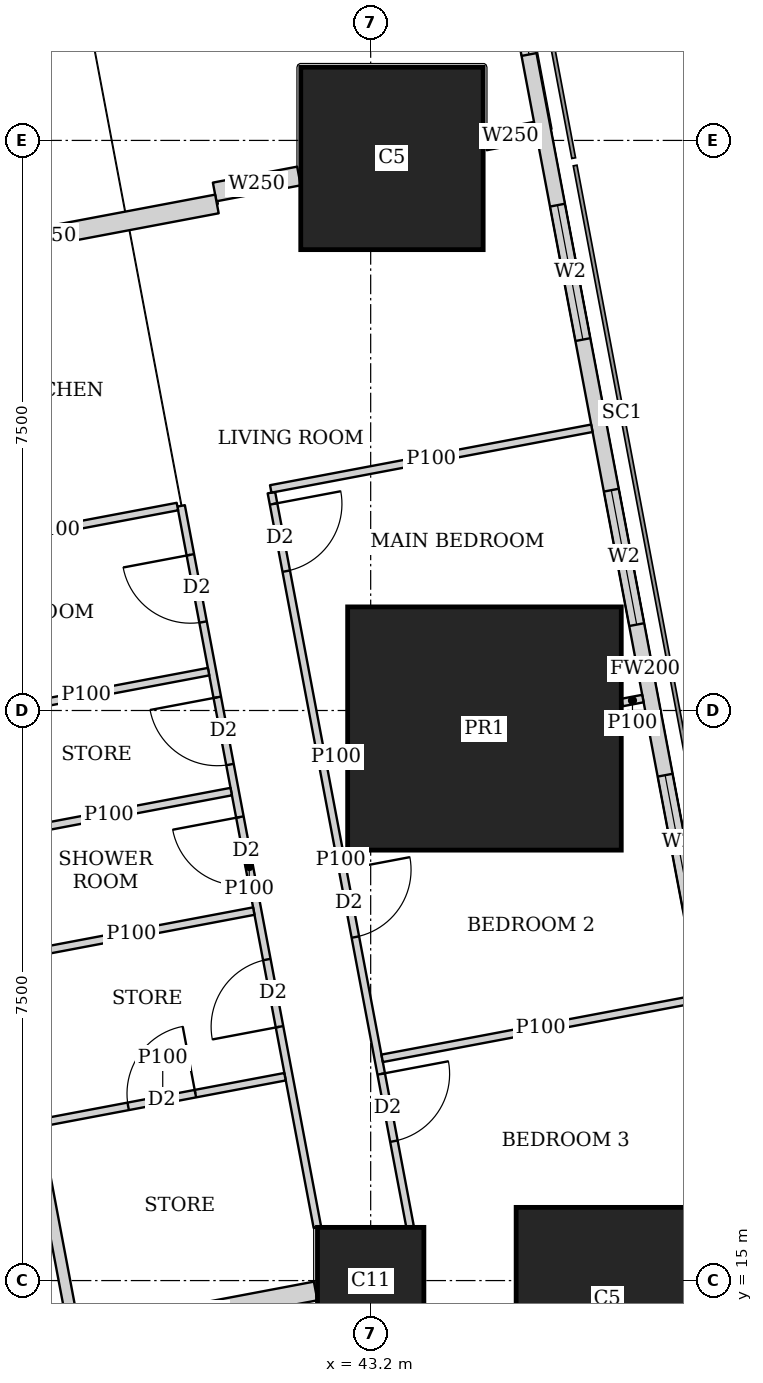
"""IFC4 building model, lengths in metres.
Left out: names, types, materials, properties, quantities, classifications, styles, units other than length and angle.
Written with IfcOpenShell. Run it as: python <this file> out.ifc"""

import sys

from ifc_helpers import new_model, si_unit, direction, frame, frame_2d, origin, origin_2d, place, context, subcontext, project, spatial, rectangle, extrude, element, fill, save


model = new_model("IFC4")
c1 = context("Model", 3, precision=1e-05, world=origin(), true_north=direction((0.0, 1.0)))
c2 = subcontext(c1, "Body", "Model", "MODEL_VIEW")
j1 = project(units=[si_unit("LENGTHUNIT", "METRE"), si_unit("PLANEANGLEUNIT", "RADIAN")], contexts=[c1])
p1 = place(None, origin())
s1 = spatial("IfcSite", under=j1, at=p1, CompositionType="ELEMENT")
p2 = place(p1, origin())
s2 = spatial("IfcBuilding", under=s1, at=p2, CompositionType="ELEMENT")
p3 = place(p2, frame((0.0, 0.0, 242.45)))
s3 = spatial("IfcBuildingStorey", under=s2, at=p3, CompositionType="ELEMENT", Elevation=242.45)
p4 = place(p3, frame((43.2, 15.0, 0.0), z_axis=(0.0, 0.0, 1.0), x_axis=(1.0, 0.0, 0.0)))
e1 = element("IfcColumn", 1, at=p4, inside=s3, PredefinedType="COLUMN", context=c2, shape_type="SweptSolid", body=[
    extrude(rectangle(XDim=1.4, YDim=1.4, at=origin_2d()), origin(), (0.0, 0.0, 1.0), 3.75),
])
p5 = place(p3, frame((46.314, 14.763, 0.0), z_axis=(0.0, 0.0, 1.0), x_axis=(1.0, 0.0, 0.0)))
e2 = element("IfcColumn", 2, at=p5, inside=s3, PredefinedType="COLUMN", context=c2, shape_type="SweptSolid", body=[
    extrude(rectangle(XDim=2.4, YDim=2.4, at=origin_2d()), origin(), (0.0, 0.0, 1.0), 3.75),
])
p6 = place(p3, frame((44.697, 22.263, 0.0), z_axis=(0.0, 0.0, 1.0), x_axis=(1.0, 0.0, 0.0)))
e3 = element("IfcColumn", 3, at=p6, inside=s3, PredefinedType="COLUMN", context=c2, shape_type="SweptSolid", body=[
    extrude(rectangle(XDim=3.6, YDim=3.2, at=origin_2d()), origin(), (0.0, 0.0, 1.0), 3.75),
])
p7 = place(p3, frame((43.48, 29.763, 0.0), z_axis=(0.0, 0.0, 1.0), x_axis=(1.0, 0.0, 0.0)))
e4 = element("IfcColumn", 4, at=p7, inside=s3, PredefinedType="COLUMN", context=c2, shape_type="SweptSolid", body=[
    extrude(rectangle(XDim=2.4, YDim=2.4, at=origin_2d()), origin(), (0.0, 0.0, 1.0), 3.75),
])
p8 = place(p3, frame((50.653, 2.703, 0.0), z_axis=(0.0, 0.0, 1.0), x_axis=(-0.185612026696, 0.982623109613, 0.0)))
e5 = element("IfcWall", 5, at=p8, inside=s3, PredefinedType="SOLIDWALL", context=c2, shape_type="SweptSolid", body=[
    extrude(rectangle(XDim=41.393, YDim=0.2, at=frame_2d((20.697, 0.0))), origin(), (0.0, 0.0, 1.0), 3.45),
])
p9 = place(p8, frame((1.633, 0.0, 0.9)))
e6 = element("IfcOpeningElement", 6, at=p9, cuts=e5, PredefinedType="OPENING", context=c2, shape_type="SweptSolid", body=[
    extrude(rectangle(XDim=1.8, YDim=1.5, at=frame_2d((0.9, 0.75))), frame((0.0, 0.11, 0.0), z_axis=(0.0, -1.0, 0.0), x_axis=(1.0, 0.0, 0.0)), (0.0, 0.0, 1.0), 0.22),
])
p10 = place(p8, frame((6.032, 0.0, 0.9)))
e7 = element("IfcOpeningElement", 7, at=p10, cuts=e5, PredefinedType="OPENING", context=c2, shape_type="SweptSolid", body=[
    extrude(rectangle(XDim=1.8, YDim=1.5, at=frame_2d((0.9, 0.75))), frame((0.0, 0.11, 0.0), z_axis=(0.0, -1.0, 0.0), x_axis=(1.0, 0.0, 0.0)), (0.0, 0.0, 1.0), 0.22),
])
p11 = place(p8, frame((9.848, 0.0, 0.9)))
e8 = element("IfcOpeningElement", 8, at=p11, cuts=e5, PredefinedType="OPENING", context=c2, shape_type="SweptSolid", body=[
    extrude(rectangle(XDim=1.8, YDim=1.5, at=frame_2d((0.9, 0.75))), frame((0.0, 0.11, 0.0), z_axis=(0.0, -1.0, 0.0), x_axis=(1.0, 0.0, 0.0)), (0.0, 0.0, 1.0), 0.22),
])
p12 = place(p8, frame((13.664, 0.0, 0.9)))
e9 = element("IfcOpeningElement", 9, at=p12, cuts=e5, PredefinedType="OPENING", context=c2, shape_type="SweptSolid", body=[
    extrude(rectangle(XDim=1.8, YDim=1.5, at=frame_2d((0.9, 0.75))), frame((0.0, 0.11, 0.0), z_axis=(0.0, -1.0, 0.0), x_axis=(1.0, 0.0, 0.0)), (0.0, 0.0, 1.0), 0.22),
])
p13 = place(p8, frame((17.481, 0.0, 0.9)))
e10 = element("IfcOpeningElement", 10, at=p13, cuts=e5, PredefinedType="OPENING", context=c2, shape_type="SweptSolid", body=[
    extrude(rectangle(XDim=1.8, YDim=1.5, at=frame_2d((0.9, 0.75))), frame((0.0, 0.11, 0.0), z_axis=(0.0, -1.0, 0.0), x_axis=(1.0, 0.0, 0.0)), (0.0, 0.0, 1.0), 0.22),
])
p14 = place(p8, frame((21.297, 0.0, 0.9)))
e11 = element("IfcOpeningElement", 11, at=p14, cuts=e5, PredefinedType="OPENING", context=c2, shape_type="SweptSolid", body=[
    extrude(rectangle(XDim=1.8, YDim=1.5, at=frame_2d((0.9, 0.75))), frame((0.0, 0.11, 0.0), z_axis=(0.0, -1.0, 0.0), x_axis=(1.0, 0.0, 0.0)), (0.0, 0.0, 1.0), 0.22),
])
p15 = place(p8, frame((25.113, 0.0, 0.9)))
e12 = element("IfcOpeningElement", 12, at=p15, cuts=e5, PredefinedType="OPENING", context=c2, shape_type="SweptSolid", body=[
    extrude(rectangle(XDim=1.8, YDim=1.5, at=frame_2d((0.9, 0.75))), frame((0.0, 0.11, 0.0), z_axis=(0.0, -1.0, 0.0), x_axis=(1.0, 0.0, 0.0)), (0.0, 0.0, 1.0), 0.22),
])
p16 = place(p8, frame((28.93, 0.0, 0.9)))
e13 = element("IfcOpeningElement", 13, at=p16, cuts=e5, PredefinedType="OPENING", context=c2, shape_type="SweptSolid", body=[
    extrude(rectangle(XDim=1.8, YDim=1.5, at=frame_2d((0.9, 0.75))), frame((0.0, 0.11, 0.0), z_axis=(0.0, -1.0, 0.0), x_axis=(1.0, 0.0, 0.0)), (0.0, 0.0, 1.0), 0.22),
])
p17 = place(p8, frame((32.746, 0.0, 0.9)))
e14 = element("IfcOpeningElement", 14, at=p17, cuts=e5, PredefinedType="OPENING", context=c2, shape_type="SweptSolid", body=[
    extrude(rectangle(XDim=1.8, YDim=1.5, at=frame_2d((0.9, 0.75))), frame((0.0, 0.11, 0.0), z_axis=(0.0, -1.0, 0.0), x_axis=(1.0, 0.0, 0.0)), (0.0, 0.0, 1.0), 0.22),
])
p18 = place(p8, frame((36.481, 0.0, 0.9)))
e15 = element("IfcOpeningElement", 15, at=p18, cuts=e5, PredefinedType="OPENING", context=c2, shape_type="SweptSolid", body=[
    extrude(rectangle(XDim=1.8, YDim=1.5, at=frame_2d((0.9, 0.75))), frame((0.0, 0.11, 0.0), z_axis=(0.0, -1.0, 0.0), x_axis=(1.0, 0.0, 0.0)), (0.0, 0.0, 1.0), 0.22),
])
p19 = place(p3, frame((33.933, 42.73, 0.0), z_axis=(0.0, 0.0, 1.0), x_axis=(0.185595417643, -0.982626246825, 0.0)))
e16 = element("IfcWall", 16, at=p19, inside=s3, PredefinedType="SOLIDWALL", context=c2, shape_type="SweptSolid", body=[
    extrude(rectangle(XDim=41.051, YDim=0.15, at=frame_2d((20.525, 0.0))), origin(), (0.0, 0.0, 1.0), 2.45),
])
p20 = place(p19, frame((12.266, 0.0, 0.0)))
e17 = element("IfcOpeningElement", 17, at=p20, cuts=e16, PredefinedType="OPENING", context=c2, shape_type="SweptSolid", body=[
    extrude(rectangle(XDim=1.0, YDim=2.1, at=frame_2d((0.5, 1.05))), frame((0.0, 0.085, 0.0), z_axis=(0.0, -1.0, 0.0), x_axis=(1.0, 0.0, 0.0)), (0.0, 0.0, 1.0), 0.17),
])
p21 = place(p19, frame((16.082, 0.0, 0.0)))
e18 = element("IfcOpeningElement", 18, at=p21, cuts=e16, PredefinedType="OPENING", context=c2, shape_type="SweptSolid", body=[
    extrude(rectangle(XDim=1.0, YDim=2.1, at=frame_2d((0.5, 1.05))), frame((0.0, 0.085, 0.0), z_axis=(0.0, -1.0, 0.0), x_axis=(1.0, 0.0, 0.0)), (0.0, 0.0, 1.0), 0.17),
])
p22 = place(p19, frame((30.862, 0.0, 0.0)))
e19 = element("IfcOpeningElement", 19, at=p22, cuts=e16, PredefinedType="OPENING", context=c2, shape_type="SweptSolid", body=[
    extrude(rectangle(XDim=1.0, YDim=2.1, at=frame_2d((0.5, 1.05))), frame((0.0, 0.085, 0.0), z_axis=(0.0, -1.0, 0.0), x_axis=(1.0, 0.0, 0.0)), (0.0, 0.0, 1.0), 0.17),
])
p23 = place(p3, frame((41.894, 25.366, 0.0), z_axis=(0.0, 0.0, 1.0), x_axis=(0.185612905165, -0.982622943675, 0.0)))
e20 = element("IfcWall", 20, at=p23, inside=s3, PredefinedType="PARTITIONING", context=c2, shape_type="SweptSolid", body=[
    extrude(rectangle(XDim=9.827, YDim=0.1, at=frame_2d((4.913, 0.0))), origin(), (0.0, 0.0, 1.0), 2.45),
])
p24 = place(p23, frame((0.151, 0.0, 0.0)))
e21 = element("IfcOpeningElement", 21, at=p24, cuts=e20, PredefinedType="OPENING", context=c2, shape_type="SweptSolid", body=[
    extrude(rectangle(XDim=0.9, YDim=2.1, at=frame_2d((0.45, 1.05))), frame((0.0, 0.06, 0.0), z_axis=(0.0, -1.0, 0.0), x_axis=(1.0, 0.0, 0.0)), (0.0, 0.0, 1.0), 0.12),
])
p25 = place(p23, frame((5.05, 0.0, 0.0)))
e22 = element("IfcOpeningElement", 22, at=p25, cuts=e20, PredefinedType="OPENING", context=c2, shape_type="SweptSolid", body=[
    extrude(rectangle(XDim=0.9, YDim=2.1, at=frame_2d((0.45, 1.05))), frame((0.0, 0.06, 0.0), z_axis=(0.0, -1.0, 0.0), x_axis=(1.0, 0.0, 0.0)), (0.0, 0.0, 1.0), 0.12),
])
p26 = place(p23, frame((7.783, 0.0, 0.0)))
e23 = element("IfcOpeningElement", 23, at=p26, cuts=e20, PredefinedType="OPENING", context=c2, shape_type="SweptSolid", body=[
    extrude(rectangle(XDim=0.9, YDim=2.1, at=frame_2d((0.45, 1.05))), frame((0.0, 0.06, 0.0), z_axis=(0.0, -1.0, 0.0), x_axis=(1.0, 0.0, 0.0)), (0.0, 0.0, 1.0), 0.12),
])
p27 = place(p3, frame((40.706, 25.192, 0.0), z_axis=(0.0, 0.0, 1.0), x_axis=(0.185629824463, -0.982619747547, 0.0)))
e24 = element("IfcWall", 24, at=p27, inside=s3, PredefinedType="PARTITIONING", context=c2, shape_type="SweptSolid", body=[
    extrude(rectangle(XDim=9.659, YDim=0.1, at=frame_2d((4.83, 0.0))), origin(), (0.0, 0.0, 1.0), 2.45),
])
p28 = place(p27, frame((0.655, 0.0, 0.0)))
e25 = element("IfcOpeningElement", 25, at=p28, cuts=e24, PredefinedType="OPENING", context=c2, shape_type="SweptSolid", body=[
    extrude(rectangle(XDim=0.9, YDim=2.1, at=frame_2d((0.45, 1.05))), frame((0.0, 0.06, 0.0), z_axis=(0.0, -1.0, 0.0), x_axis=(1.0, 0.0, 0.0)), (0.0, 0.0, 1.0), 0.12),
])
p29 = place(p27, frame((4.166, 0.0, 0.0)))
e26 = element("IfcOpeningElement", 26, at=p29, cuts=e24, PredefinedType="OPENING", context=c2, shape_type="SweptSolid", body=[
    extrude(rectangle(XDim=0.9, YDim=2.1, at=frame_2d((0.45, 1.05))), frame((0.0, 0.06, 0.0), z_axis=(0.0, -1.0, 0.0), x_axis=(1.0, 0.0, 0.0)), (0.0, 0.0, 1.0), 0.12),
])
p30 = place(p27, frame((2.563, 0.0, 0.0)))
e27 = element("IfcOpeningElement", 27, at=p30, cuts=e24, PredefinedType="OPENING", context=c2, shape_type="SweptSolid", body=[
    extrude(rectangle(XDim=0.9, YDim=2.1, at=frame_2d((0.45, 1.05))), frame((0.0, 0.06, 0.0), z_axis=(0.0, -1.0, 0.0), x_axis=(1.0, 0.0, 0.0)), (0.0, 0.0, 1.0), 0.12),
])
p31 = place(p27, frame((6.074, 0.0, 0.0)))
e28 = element("IfcOpeningElement", 28, at=p31, cuts=e24, PredefinedType="OPENING", context=c2, shape_type="SweptSolid", body=[
    extrude(rectangle(XDim=0.9, YDim=2.1, at=frame_2d((0.45, 1.05))), frame((0.0, 0.06, 0.0), z_axis=(0.0, -1.0, 0.0), x_axis=(1.0, 0.0, 0.0)), (0.0, 0.0, 1.0), 0.12),
])
p32 = place(p3, frame((46.11, 26.213, 0.0), z_axis=(0.0, 0.0, 1.0), x_axis=(-0.982633535512, -0.185556823879, 0.0)))
e29 = element("IfcWall", 29, at=p32, inside=s3, PredefinedType="PARTITIONING", context=c2, shape_type="SweptSolid", body=[
    extrude(rectangle(XDim=4.3, YDim=0.1, at=frame_2d((2.15, 0.0))), origin(), (0.0, 0.0, 1.0), 2.0),
])
p33 = place(p3, frame((46.782, 22.657, 0.0), z_axis=(0.0, 0.0, 1.0), x_axis=(-0.982574553168, -0.185868898601, 0.0)))
e30 = element("IfcWall", 30, at=p33, inside=s3, PredefinedType="PARTITIONING", context=c2, shape_type="SweptSolid", body=[
    extrude(rectangle(XDim=0.28, YDim=0.1, at=frame_2d((0.14, 0.0))), origin(), (0.0, 0.0, 1.0), 3.45),
])
p34 = place(p3, frame((42.887, 21.921, 0.0), z_axis=(0.0, 0.0, 1.0), x_axis=(-0.982688058078, -0.185267861514, 0.0)))
e31 = element("IfcWall", 31, at=p34, inside=s3, PredefinedType="PARTITIONING", context=c2, shape_type="SweptSolid", body=[
    extrude(rectangle(XDim=0.286, YDim=0.1, at=frame_2d((0.143, 0.0))), origin(), (0.0, 0.0, 1.0), 2.45),
])
p35 = place(p3, frame((47.527, 18.712, 0.0), z_axis=(0.0, 0.0, 1.0), x_axis=(-0.982665405803, -0.185387972203, 0.0)))
e32 = element("IfcWall", 32, at=p35, inside=s3, PredefinedType="PARTITIONING", context=c2, shape_type="SweptSolid", body=[
    extrude(rectangle(XDim=4.25, YDim=0.1, at=frame_2d((2.125, 0.0))), origin(), (0.0, 0.0, 1.0), 2.0),
])
for number, where, z_axis, x_axis in (
    (33, (40.657, 25.183, 0.0), (0.0, 0.0, 1.0), (-0.983, -0.186, 0.0)),
    (34, (41.365, 21.433, 0.0), (0.0, 0.0, 1.0), (-0.983, -0.186, 0.0)),
):
    element("IfcWall", number, at=place(p3, frame(where, z_axis=z_axis, x_axis=x_axis)), inside=s3, PredefinedType="PARTITIONING", context=c2, shape_type="SweptSolid", body=[
        extrude(rectangle(XDim=3.275, YDim=0.1, at=frame_2d((1.637, 0.0))), origin(), (0.0, 0.0, 1.0), 3.45),
    ])
p36 = place(p3, frame((42.073, 17.682, 0.0), z_axis=(0.0, 0.0, 1.0), x_axis=(-0.982620626894, -0.185625169636, 0.0)))
e35 = element("IfcWall", 35, at=p36, inside=s3, PredefinedType="PARTITIONING", context=c2, shape_type="SweptSolid", body=[
    extrude(rectangle(XDim=3.275, YDim=0.1, at=frame_2d((1.637, 0.0))), origin(), (0.0, 0.0, 1.0), 3.45),
])
p37 = place(p36, frame((1.2, 0.0, 0.0)))
e36 = element("IfcOpeningElement", 36, at=p37, cuts=e35, PredefinedType="OPENING", context=c2, shape_type="SweptSolid", body=[
    extrude(rectangle(XDim=0.9, YDim=2.1, at=frame_2d((0.45, 1.05))), frame((0.0, 0.06, 0.0), z_axis=(0.0, -1.0, 0.0), x_axis=(1.0, 0.0, 0.0)), (0.0, 0.0, 1.0), 0.12),
])
p38 = place(p3, frame((41.067, 23.011, 0.0), z_axis=(0.0, 0.0, 1.0), x_axis=(-0.982618057925, -0.185638768151, 0.0)))
e37 = element("IfcWall", 37, at=p38, inside=s3, PredefinedType="PARTITIONING", context=c2, shape_type="SweptSolid", body=[
    extrude(rectangle(XDim=3.275, YDim=0.1, at=frame_2d((1.637, 0.0))), origin(), (0.0, 0.0, 1.0), 2.45),
])
p39 = place(p3, frame((41.662, 19.861, 0.0), z_axis=(0.0, 0.0, 1.0), x_axis=(-0.982607026909, -0.185697147715, 0.0)))
e38 = element("IfcWall", 38, at=p39, inside=s3, PredefinedType="PARTITIONING", context=c2, shape_type="SweptSolid", body=[
    extrude(rectangle(XDim=3.275, YDim=0.1, at=frame_2d((1.637, 0.0))), origin(), (0.0, 0.0, 1.0), 3.45),
])
p40 = place(p3, frame((45.372, 30.121, 0.0), z_axis=(0.0, 0.0, 1.0), x_axis=(-0.982347993061, -0.187062611252, 0.0)))
e39 = element("IfcWall", 39, at=p40, inside=s3, PredefinedType="SOLIDWALL", context=c2, shape_type="SweptSolid", body=[
    extrude(rectangle(XDim=0.68, YDim=0.25, at=frame_2d((0.34, 0.0))), origin(), (0.0, 0.0, 1.0), 2.0),
])
p41 = place(p3, frame((42.256, 29.532, 0.0), z_axis=(0.0, 0.0, 1.0), x_axis=(-0.982549954272, -0.185998890749, 0.0)))
e40 = element("IfcWall", 40, at=p41, inside=s3, PredefinedType="SOLIDWALL", context=c2, shape_type="SweptSolid", body=[
    extrude(rectangle(XDim=1.129, YDim=0.25, at=frame_2d((0.564, 0.0))), origin(), (0.0, 0.0, 1.0), 2.0),
])
p42 = place(p3, frame((41.177, 29.164, 0.0), z_axis=(0.0, 0.0, 1.0), x_axis=(-0.982612837616, -0.185666398014, 0.0)))
e41 = element("IfcWall", 41, at=p42, inside=s3, PredefinedType="SOLIDWALL", context=c2, shape_type="SweptSolid", body=[
    extrude(rectangle(XDim=4.525, YDim=0.25, at=frame_2d((2.262, 0.0))), origin(), (0.0, 0.0, 1.0), 2.45),
])
p43 = place(p3, frame((42.476, 14.863, 0.0), z_axis=(0.0, 0.0, 1.0), x_axis=(-0.982638716117, -0.185529387398, 0.0)))
e42 = element("IfcWall", 42, at=p43, inside=s3, PredefinedType="SOLIDWALL", context=c2, shape_type="SweptSolid", body=[
    extrude(rectangle(XDim=3.148, YDim=0.25, at=frame_2d((1.574, 0.0))), origin(), (0.0, 0.0, 1.0), 3.45),
])
p44 = place(p13, origin())
e43 = element("IfcWindow", 43, at=p44, inside=s3, PartitioningType="SINGLE_PANEL", PredefinedType="WINDOW", context=c2, shape_type="SweptSolid", body=[
    extrude(rectangle(XDim=1.8, YDim=1.5, at=frame_2d((0.9, 0.75))), frame((0.0, 0.03, 0.0), z_axis=(0.0, -1.0, 0.0), x_axis=(1.0, 0.0, 0.0)), (0.0, 0.0, 1.0), 0.06),
])
fill(e10, e43)
p45 = place(p14, origin())
e44 = element("IfcWindow", 44, at=p45, inside=s3, PartitioningType="SINGLE_PANEL", PredefinedType="WINDOW", context=c2, shape_type="SweptSolid", body=[
    extrude(rectangle(XDim=1.8, YDim=1.5, at=frame_2d((0.9, 0.75))), frame((0.0, 0.03, 0.0), z_axis=(0.0, -1.0, 0.0), x_axis=(1.0, 0.0, 0.0)), (0.0, 0.0, 1.0), 0.06),
])
fill(e11, e44)
p46 = place(p15, origin())
e45 = element("IfcWindow", 45, at=p46, inside=s3, PartitioningType="SINGLE_PANEL", PredefinedType="WINDOW", context=c2, shape_type="SweptSolid", body=[
    extrude(rectangle(XDim=1.8, YDim=1.5, at=frame_2d((0.9, 0.75))), frame((0.0, 0.03, 0.0), z_axis=(0.0, -1.0, 0.0), x_axis=(1.0, 0.0, 0.0)), (0.0, 0.0, 1.0), 0.06),
])
fill(e12, e45)
p47 = place(p16, origin())
e46 = element("IfcWindow", 46, at=p47, inside=s3, PartitioningType="SINGLE_PANEL", PredefinedType="WINDOW", context=c2, shape_type="SweptSolid", body=[
    extrude(rectangle(XDim=1.8, YDim=1.5, at=frame_2d((0.9, 0.75))), frame((0.0, 0.03, 0.0), z_axis=(0.0, -1.0, 0.0), x_axis=(1.0, 0.0, 0.0)), (0.0, 0.0, 1.0), 0.06),
])
fill(e13, e46)
p48 = place(p24, origin())
e47 = element("IfcDoor", 47, at=p48, inside=s3, OperationType="SINGLE_SWING_LEFT", PredefinedType="DOOR", context=c2, shape_type="SweptSolid", body=[
    extrude(rectangle(XDim=0.9, YDim=2.1, at=frame_2d((0.45, 1.05))), frame((0.0, 0.025, 0.0), z_axis=(0.0, -1.0, 0.0), x_axis=(1.0, 0.0, 0.0)), (0.0, 0.0, 1.0), 0.05),
])
fill(e21, e47)
p49 = place(p25, origin())
e48 = element("IfcDoor", 48, at=p49, inside=s3, OperationType="SINGLE_SWING_LEFT", PredefinedType="DOOR", context=c2, shape_type="SweptSolid", body=[
    extrude(rectangle(XDim=0.9, YDim=2.1, at=frame_2d((0.45, 1.05))), frame((0.0, 0.025, 0.0), z_axis=(0.0, -1.0, 0.0), x_axis=(1.0, 0.0, 0.0)), (0.0, 0.0, 1.0), 0.05),
])
fill(e22, e48)
p50 = place(p26, origin())
e49 = element("IfcDoor", 49, at=p50, inside=s3, OperationType="SINGLE_SWING_LEFT", PredefinedType="DOOR", context=c2, shape_type="SweptSolid", body=[
    extrude(rectangle(XDim=0.9, YDim=2.1, at=frame_2d((0.45, 1.05))), frame((0.0, 0.025, 0.0), z_axis=(0.0, -1.0, 0.0), x_axis=(1.0, 0.0, 0.0)), (0.0, 0.0, 1.0), 0.05),
])
fill(e23, e49)
p51 = place(p28, origin())
e50 = element("IfcDoor", 50, at=p51, inside=s3, OperationType="SINGLE_SWING_RIGHT", PredefinedType="DOOR", context=c2, shape_type="SweptSolid", body=[
    extrude(rectangle(XDim=0.9, YDim=2.1, at=frame_2d((0.45, 1.05))), frame((0.0, 0.025, 0.0), z_axis=(0.0, -1.0, 0.0), x_axis=(1.0, 0.0, 0.0)), (0.0, 0.0, 1.0), 0.05),
])
fill(e25, e50)
p52 = place(p29, origin())
e51 = element("IfcDoor", 51, at=p52, inside=s3, OperationType="SINGLE_SWING_RIGHT", PredefinedType="DOOR", context=c2, shape_type="SweptSolid", body=[
    extrude(rectangle(XDim=0.9, YDim=2.1, at=frame_2d((0.45, 1.05))), frame((0.0, 0.025, 0.0), z_axis=(0.0, -1.0, 0.0), x_axis=(1.0, 0.0, 0.0)), (0.0, 0.0, 1.0), 0.05),
])
fill(e26, e51)
p53 = place(p30, origin())
e52 = element("IfcDoor", 52, at=p53, inside=s3, OperationType="SINGLE_SWING_RIGHT", PredefinedType="DOOR", context=c2, shape_type="SweptSolid", body=[
    extrude(rectangle(XDim=0.9, YDim=2.1, at=frame_2d((0.45, 1.05))), frame((0.0, 0.025, 0.0), z_axis=(0.0, -1.0, 0.0), x_axis=(1.0, 0.0, 0.0)), (0.0, 0.0, 1.0), 0.05),
])
fill(e27, e52)
p54 = place(p31, origin())
e53 = element("IfcDoor", 53, at=p54, inside=s3, OperationType="SINGLE_SWING_LEFT", PredefinedType="DOOR", context=c2, shape_type="SweptSolid", body=[
    extrude(rectangle(XDim=0.9, YDim=2.1, at=frame_2d((0.45, 1.05))), frame((0.0, 0.025, 0.0), z_axis=(0.0, -1.0, 0.0), x_axis=(1.0, 0.0, 0.0)), (0.0, 0.0, 1.0), 0.05),
])
fill(e28, e53)
p55 = place(p37, origin())
e54 = element("IfcDoor", 54, at=p55, inside=s3, OperationType="SINGLE_SWING_RIGHT", PredefinedType="DOOR", context=c2, shape_type="SweptSolid", body=[
    extrude(rectangle(XDim=0.9, YDim=2.1, at=frame_2d((0.45, 1.05))), frame((0.0, 0.025, 0.0), z_axis=(0.0, -1.0, 0.0), x_axis=(1.0, 0.0, 0.0)), (0.0, 0.0, 1.0), 0.05),
])
fill(e36, e54)
save(model, sys.argv[1])
